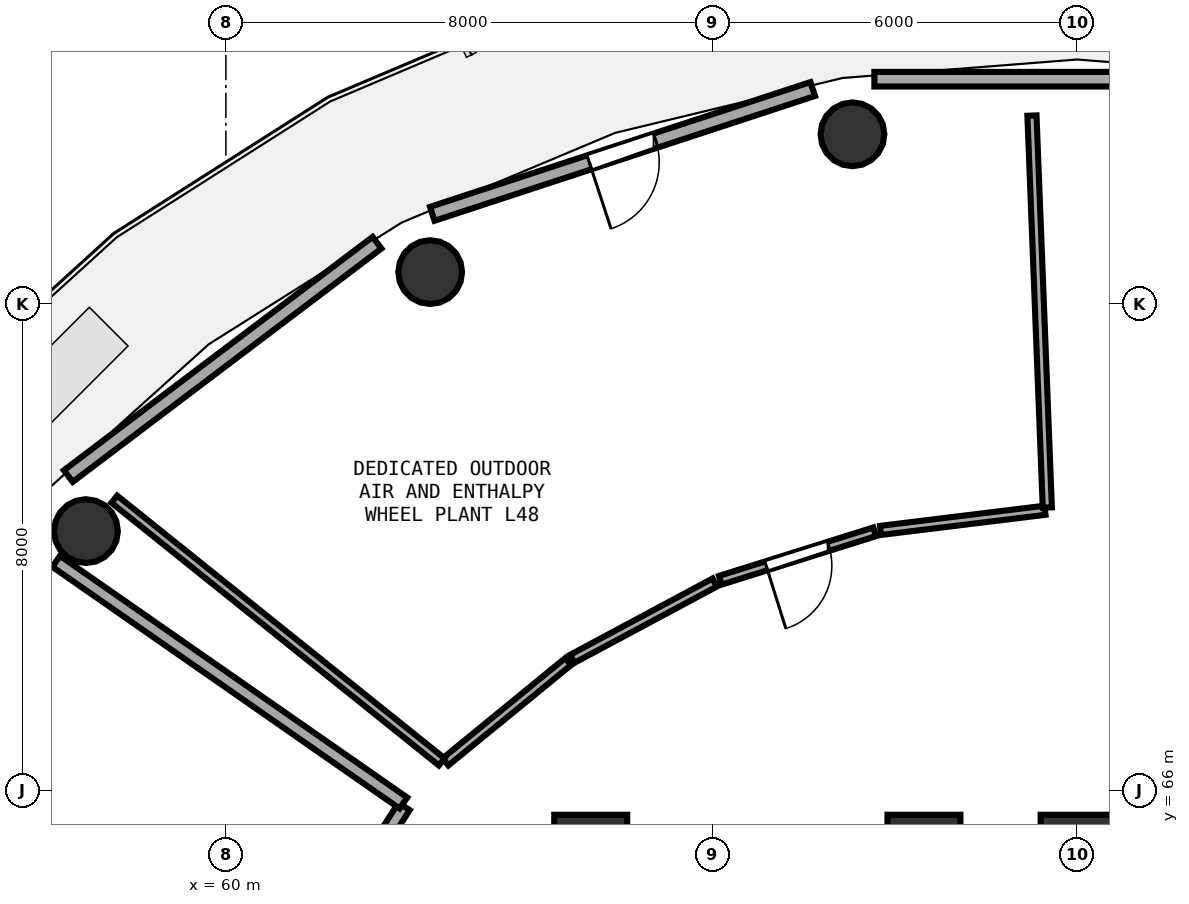
"""IFC4 building model, lengths in metres.
Left out: names, types, materials, properties, quantities, classifications, styles, units other than length and angle.
Written with IfcOpenShell. Run it as: python <this file> out.ifc"""

import sys

from ifc_helpers import new_model, si_unit, direction, frame, frame_2d, origin, origin_2d, place, context, subcontext, project, spatial, rectangle, circle, extrude, element, fill, save


model = new_model("IFC4")
c1 = context("Model", 3, precision=1e-05, world=origin(), true_north=direction((0.0, 1.0)))
c2 = subcontext(c1, "Body", "Model", "MODEL_VIEW")
j1 = project(units=[si_unit("LENGTHUNIT", "METRE"), si_unit("PLANEANGLEUNIT", "RADIAN")], contexts=[c1])
p1 = place(None, origin())
s1 = spatial("IfcSite", under=j1, at=p1, CompositionType="ELEMENT")
p2 = place(p1, origin())
s2 = spatial("IfcBuilding", under=s1, at=p2, CompositionType="ELEMENT")
p3 = place(p2, frame((0.0, 0.0, 189.11)))
s3 = spatial("IfcBuildingStorey", under=s2, at=p3, CompositionType="ELEMENT", Elevation=189.11)
for number, where, z_axis, x_axis in (
    (1, (74.0, 65.0, 0.0), (0.0, 0.0, 1.0), (1.0, 0.0, 0.0)),
    (2, (71.48, 65.0, 0.0), (0.0, 0.0, 1.0), (1.0, 0.0, 0.0)),
    (3, (66.0, 65.0, 0.0), (0.0, 0.0, 1.0), (1.0, 0.0, 0.0)),
):
    element("IfcColumn", number, at=place(p3, frame(where, z_axis=z_axis, x_axis=x_axis)), inside=s3, PredefinedType="PILASTER", context=c2, shape_type="SweptSolid", body=[
        extrude(rectangle(XDim=1.2, YDim=1.2, at=origin_2d()), origin(), (0.0, 0.0, 1.0), 4.09),
    ])
for number, where, z_axis, x_axis in (
    (4, (70.305, 76.79, 0.0), (0.0, 0.0, 1.0), (1.0, 0.0, 0.0)),
    (5, (63.36, 74.524, 0.0), (0.0, 0.0, 1.0), (1.0, 0.0, 0.0)),
    (6, (57.698, 70.264, 0.0), (0.0, 0.0, 1.0), (1.0, 0.0, 0.0)),
):
    element("IfcColumn", number, at=place(p3, frame(where, z_axis=z_axis, x_axis=x_axis)), inside=s3, PredefinedType="COLUMN", context=c2, shape_type="SweptSolid", body=[
        extrude(circle(Radius=0.525, at=origin_2d()), origin(), (0.0, 0.0, 1.0), 4.09),
    ])
p4 = place(p3, frame((77.335, 77.696, 0.0), z_axis=(0.0, 0.0, 1.0), x_axis=(-1.0, 0.0, 0.0)))
e7 = element("IfcWall", 7, at=p4, inside=s3, PredefinedType="SOLIDWALL", context=c2, shape_type="SweptSolid", body=[
    extrude(rectangle(XDim=6.67, YDim=0.24, at=frame_2d((3.335, 0.0))), origin(), (0.0, 0.0, 1.0), 3.815),
])
p5 = place(p3, frame((69.651, 77.534, 0.0), z_axis=(0.0, 0.0, 1.0), x_axis=(-0.950214424667, -0.31159677013, 0.0)))
e8 = element("IfcWall", 8, at=p5, inside=s3, PredefinedType="SOLIDWALL", context=c2, shape_type="SweptSolid", body=[
    extrude(rectangle(XDim=6.585, YDim=0.24, at=frame_2d((3.292, 0.0))), origin(), (0.0, 0.0, 1.0), 3.815),
])
p6 = place(p5, frame((2.717, 0.0, 0.0)))
e9 = element("IfcOpeningElement", 9, at=p6, cuts=e8, PredefinedType="OPENING", context=c2, shape_type="SweptSolid", body=[
    extrude(rectangle(XDim=1.15, YDim=2.15, at=frame_2d((0.575, 1.075))), frame((0.0, 0.13, 0.0), z_axis=(0.0, -1.0, 0.0), x_axis=(1.0, 0.0, 0.0)), (0.0, 0.0, 1.0), 0.26),
])
p7 = place(p3, frame((62.485, 75.007, 0.0), z_axis=(0.0, 0.0, 1.0), x_axis=(-0.797724599481, -0.603021942704, 0.0)))
e10 = element("IfcWall", 10, at=p7, inside=s3, PredefinedType="SOLIDWALL", context=c2, shape_type="SweptSolid", body=[
    extrude(rectangle(XDim=6.364, YDim=0.24, at=frame_2d((3.182, 0.0))), origin(), (0.0, 0.0, 1.0), 3.815),
])
p8 = place(p3, frame((70.67, 70.253, 0.0), z_axis=(0.0, 0.0, 1.0), x_axis=(-0.954072441826, -0.299575993278, 0.0)))
e11 = element("IfcWall", 11, at=p8, inside=s3, PredefinedType="PARTITIONING", context=c2, shape_type="SweptSolid", body=[
    extrude(rectangle(XDim=2.66, YDim=0.15, at=frame_2d((1.33, 0.0))), origin(), (0.0, 0.0, 1.0), 3.82),
])
p9 = place(p8, frame((0.79, 0.0, 0.0)))
e12 = element("IfcOpeningElement", 12, at=p9, cuts=e11, PredefinedType="OPENING", context=c2, shape_type="SweptSolid", body=[
    extrude(rectangle(XDim=1.08, YDim=2.1, at=frame_2d((0.54, 1.05))), frame((0.0, 0.085, 0.0), z_axis=(0.0, -1.0, 0.0), x_axis=(1.0, 0.0, 0.0)), (0.0, 0.0, 1.0), 0.17),
])
p10 = place(p3, frame((73.471, 70.607, 0.0), z_axis=(0.0, 0.0, 1.0), x_axis=(-0.99258087274, -0.12158622895, 0.0)))
e13 = element("IfcWall", 13, at=p10, inside=s3, PredefinedType="PARTITIONING", context=c2, shape_type="SweptSolid", body=[
    extrude(rectangle(XDim=2.725, YDim=0.15, at=frame_2d((1.362, 0.0))), origin(), (0.0, 0.0, 1.0), 3.365),
])
p11 = place(p3, frame((68.04, 69.419, 0.0), z_axis=(0.0, 0.0, 1.0), x_axis=(-0.881492256426, -0.47219847719, 0.0)))
e14 = element("IfcWall", 14, at=p11, inside=s3, PredefinedType="PARTITIONING", context=c2, shape_type="SweptSolid", body=[
    extrude(rectangle(XDim=2.658, YDim=0.15, at=frame_2d((1.329, 0.0))), origin(), (0.0, 0.0, 1.0), 3.575),
])
p12 = place(p3, frame((65.63, 68.12, 0.0), z_axis=(0.0, 0.0, 1.0), x_axis=(-0.774061607798, -0.633110280546, 0.0)))
e15 = element("IfcWall", 15, at=p12, inside=s3, PredefinedType="PARTITIONING", context=c2, shape_type="SweptSolid", body=[
    extrude(rectangle(XDim=2.607, YDim=0.15, at=frame_2d((1.303, 0.0))), origin(), (0.0, 0.0, 1.0), 3.365),
])
p13 = place(p3, frame((63.55, 66.469, 0.0), z_axis=(0.0, 0.0, 1.0), x_axis=(-0.77998820796, 0.625794211737, 0.0)))
e16 = element("IfcWall", 16, at=p13, inside=s3, PredefinedType="PARTITIONING", context=c2, shape_type="SweptSolid", body=[
    extrude(rectangle(XDim=6.903, YDim=0.15, at=frame_2d((3.452, 0.0))), origin(), (0.0, 0.0, 1.0), 3.365),
])
p14 = place(p3, frame((73.257, 77.098, 0.0), z_axis=(0.0, 0.0, 1.0), x_axis=(0.039209277228, -0.999231020625, 0.0)))
e17 = element("IfcWall", 17, at=p14, inside=s3, PredefinedType="PARTITIONING", context=c2, shape_type="SweptSolid", body=[
    extrude(rectangle(XDim=6.451, YDim=0.15, at=frame_2d((3.225, 0.0))), origin(), (0.0, 0.0, 1.0), 3.415),
])
p15 = place(p3, frame((62.93, 65.736, 0.0), z_axis=(0.0, 0.0, 1.0), x_axis=(-0.539849412271, -0.841761612376, 0.0)))
e18 = element("IfcWall", 18, at=p15, inside=s3, PredefinedType="SOLIDWALL", context=c2, shape_type="SweptSolid", body=[
    extrude(rectangle(XDim=3.534, YDim=0.22, at=frame_2d((1.767, 0.0))), origin(), (0.0, 0.0, 1.0), 3.365),
])
p16 = place(p3, frame((57.209, 69.767, 0.0), z_axis=(0.0, 0.0, 1.0), x_axis=(0.820778585788, -0.571246455667, 0.0)))
e19 = element("IfcWall", 19, at=p16, inside=s3, PredefinedType="SOLIDWALL", context=c2, shape_type="SweptSolid", body=[
    extrude(rectangle(XDim=6.957, YDim=0.22, at=frame_2d((3.479, 0.0))), origin(), (0.0, 0.0, 1.0), 3.415),
])
p17 = place(p6, frame((1.15, 0.0, 0.0), z_axis=(0.0, 0.0, 1.0), x_axis=(-1.0, 0.0, 0.0)))
e20 = element("IfcDoor", 20, at=p17, inside=s3, OperationType="SINGLE_SWING_LEFT", PredefinedType="DOOR", context=c2, shape_type="SweptSolid", body=[
    extrude(rectangle(XDim=1.15, YDim=2.15, at=frame_2d((0.575, 1.075))), frame((0.0, 0.025, 0.0), z_axis=(0.0, -1.0, 0.0), x_axis=(1.0, 0.0, 0.0)), (0.0, 0.0, 1.0), 0.05),
])
fill(e9, e20)
p18 = place(p9, origin())
e21 = element("IfcDoor", 21, at=p18, inside=s3, OperationType="SINGLE_SWING_RIGHT", PredefinedType="DOOR", context=c2, shape_type="SweptSolid", body=[
    extrude(rectangle(XDim=1.08, YDim=2.1, at=frame_2d((0.54, 1.05))), frame((0.0, 0.025, 0.0), z_axis=(0.0, -1.0, 0.0), x_axis=(1.0, 0.0, 0.0)), (0.0, 0.0, 1.0), 0.05),
])
fill(e12, e21)
save(model, sys.argv[1])
